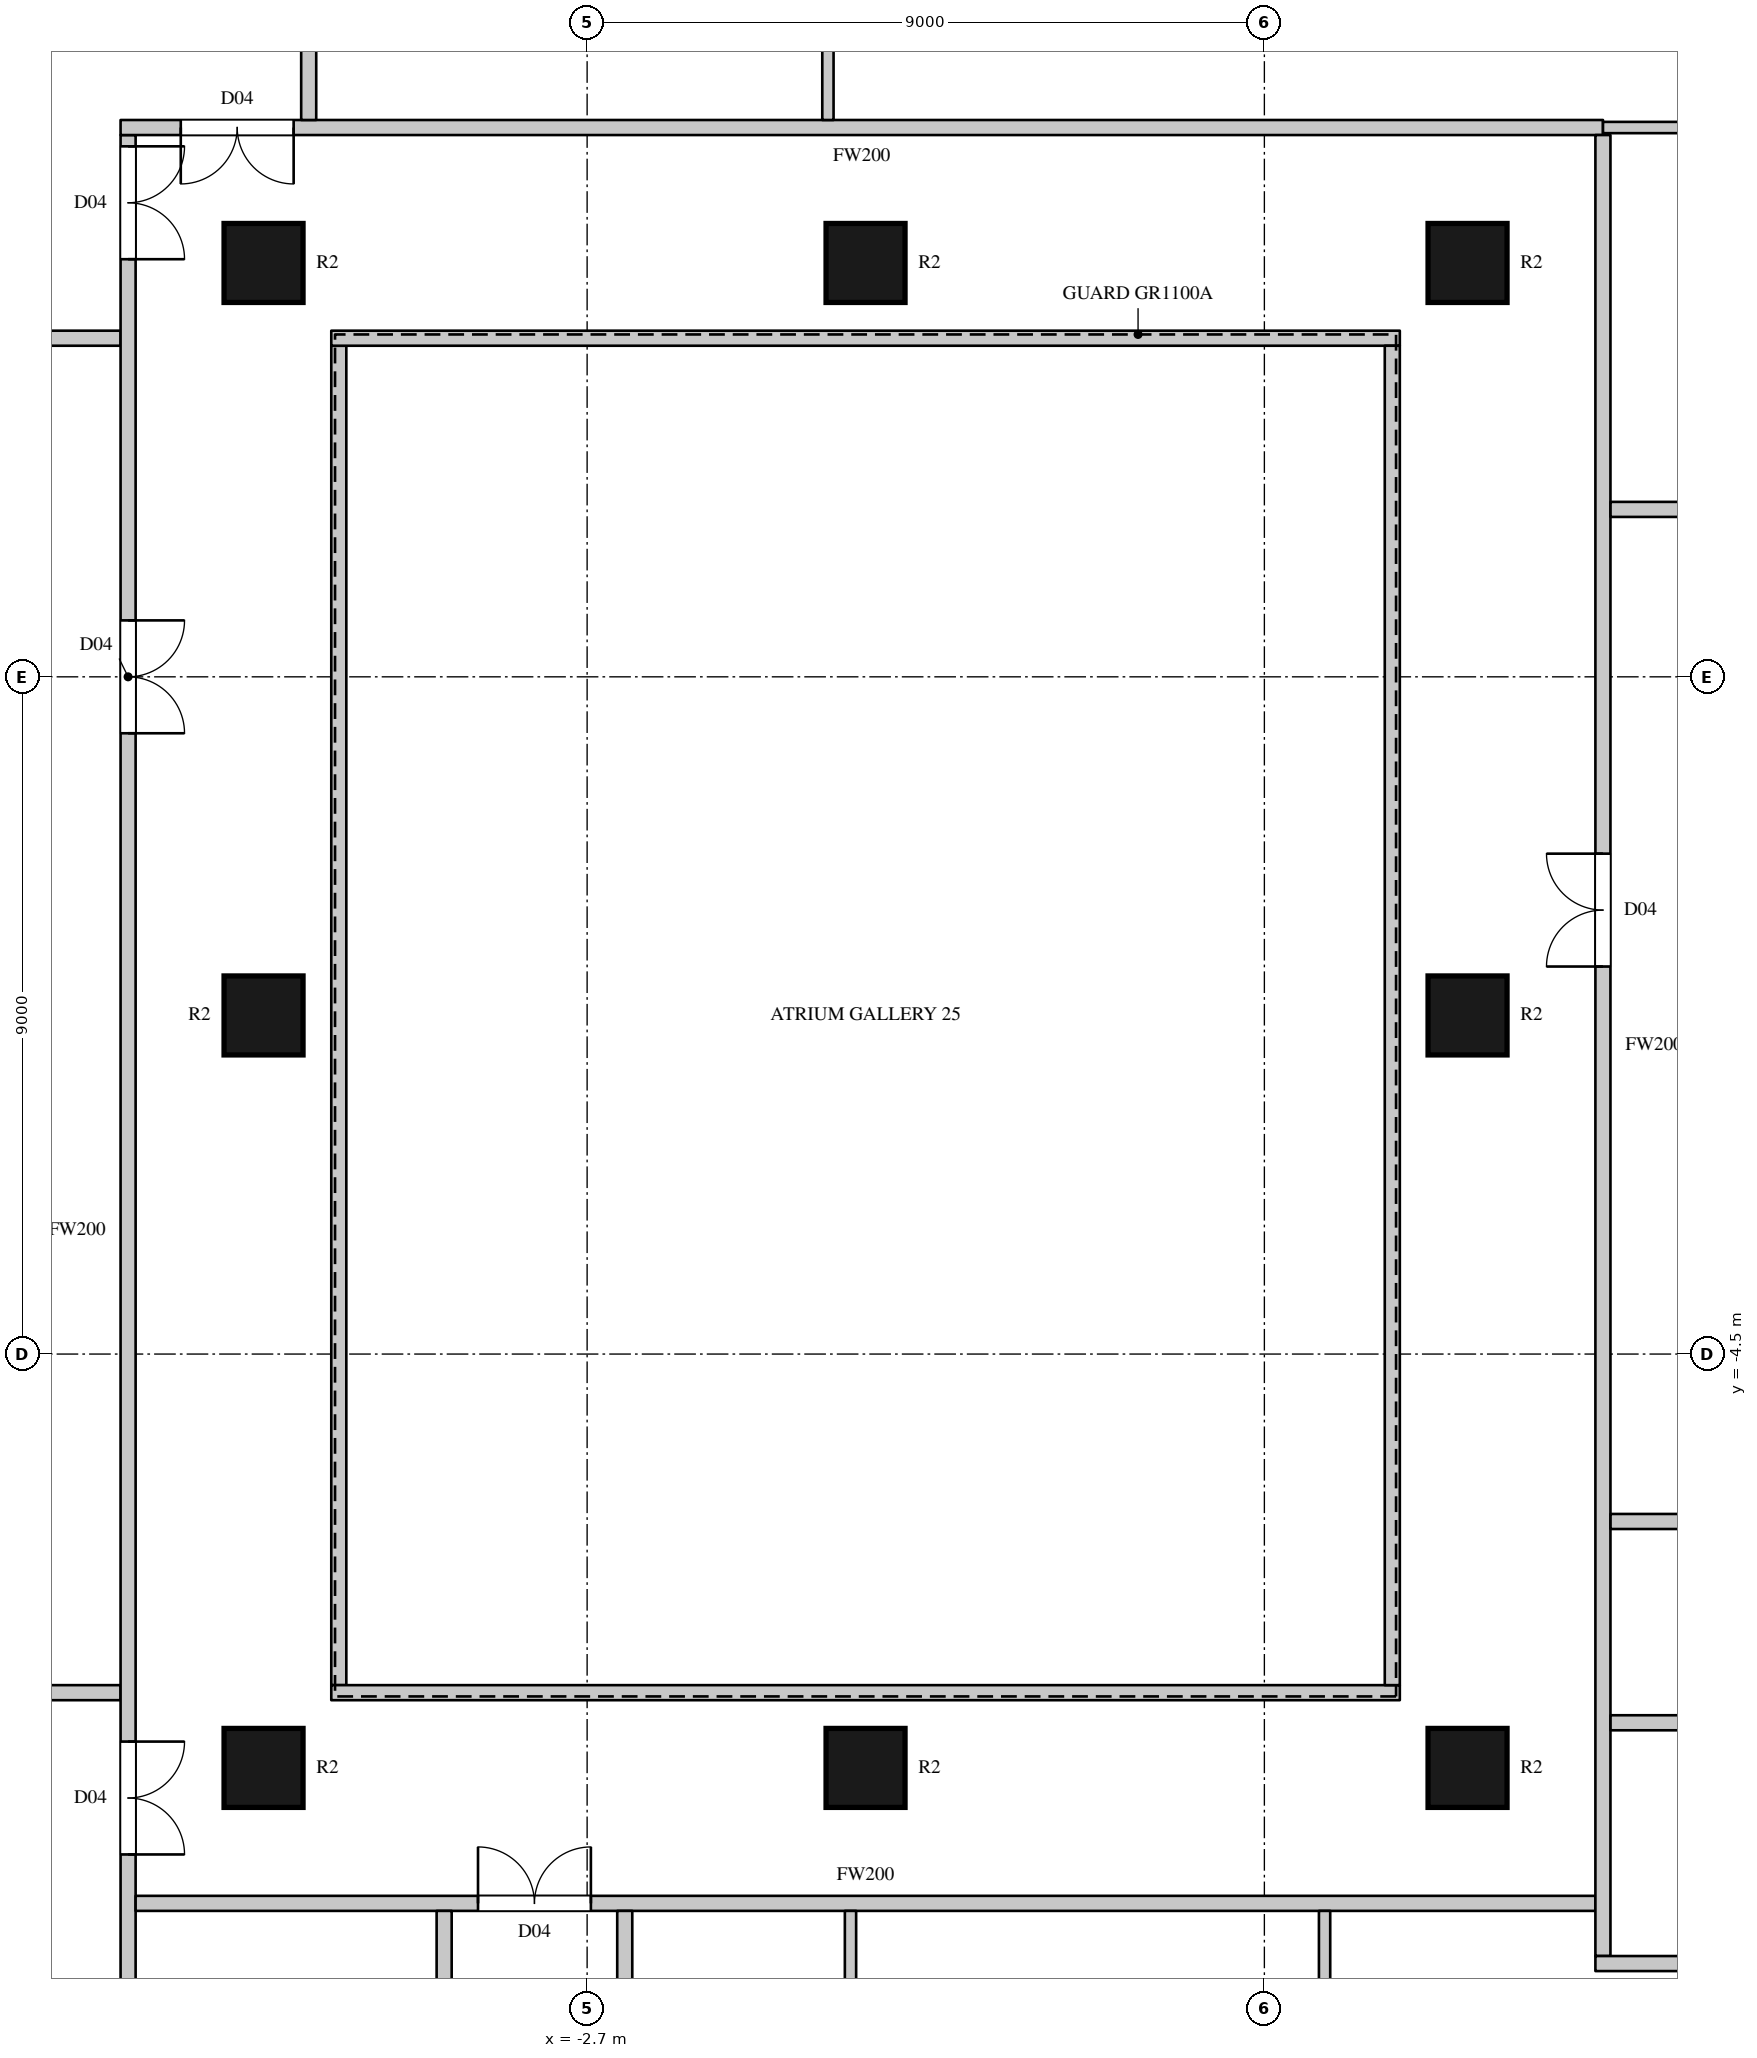
"""IFC4 building model, lengths in metres.
Left out: names, types, materials, properties, quantities, classifications, styles, units other than length and angle.
Written with IfcOpenShell. Run it as: python <this file> out.ifc"""

import sys

from ifc_helpers import new_model, si_unit, direction, frame, frame_2d, origin, origin_2d, place, context, subcontext, project, spatial, rectangle, circle, extrude, element, fill, save


model = new_model("IFC4")
c1 = context("Model", 3, precision=1e-05, world=origin(), true_north=direction((0.0, 1.0)))
c2 = subcontext(c1, "Body", "Model", "MODEL_VIEW")
j1 = project(units=[si_unit("LENGTHUNIT", "METRE"), si_unit("PLANEANGLEUNIT", "RADIAN")], contexts=[c1])
p1 = place(None, origin())
s1 = spatial("IfcSite", under=j1, at=p1, CompositionType="ELEMENT")
p2 = place(p1, origin())
s2 = spatial("IfcBuilding", under=s1, at=p2, CompositionType="ELEMENT")
p3 = place(p2, frame((0.0, 0.0, 120.3)))
s3 = spatial("IfcBuildingStorey", under=s2, at=p3, CompositionType="ELEMENT", Elevation=120.3)
for number, where, z_axis, x_axis in (
    (1, (-7.0, -10.0, 0.0), (0.0, 0.0, 1.0), (1.0, 0.0, 0.0)),
    (2, (-7.0, 0.0, 0.0), (0.0, 0.0, 1.0), (1.0, 0.0, 0.0)),
    (3, (-7.0, 10.0, 0.0), (0.0, 0.0, 1.0), (1.0, 0.0, 0.0)),
    (4, (1.0, -10.0, 0.0), (0.0, 0.0, 1.0), (1.0, 0.0, 0.0)),
    (5, (1.0, 10.0, 0.0), (0.0, 0.0, 1.0), (1.0, 0.0, 0.0)),
    (6, (9.0, -10.0, 0.0), (0.0, 0.0, 1.0), (1.0, 0.0, 0.0)),
    (7, (9.0, 0.0, 0.0), (0.0, 0.0, 1.0), (1.0, 0.0, 0.0)),
    (8, (9.0, 10.0, 0.0), (0.0, 0.0, 1.0), (1.0, 0.0, 0.0)),
):
    element("IfcColumn", number, at=place(p3, frame(where, z_axis=z_axis, x_axis=x_axis)), inside=s3, PredefinedType="COLUMN", context=c2, shape_type="SweptSolid", body=[
        extrude(circle(Radius=0.525, at=origin_2d()), origin(), (0.0, 0.0, 1.0), 3.6),
    ])
p4 = place(p3, frame((-13.97, -9.0, 0.0), z_axis=(0.0, 0.0, 1.0), x_axis=(1.0, 0.0, 0.0)))
e9 = element("IfcWall", 9, at=p4, inside=s3, PredefinedType="PARTITIONING", context=c2, shape_type="SweptSolid", body=[
    extrude(rectangle(XDim=5.07, YDim=0.2, at=frame_2d((2.535, 0.0))), origin(), (0.0, 0.0, 1.0), 3.3),
])
p5 = place(p4, frame((0.4, 0.0, 0.0)))
e10 = element("IfcOpeningElement", 10, at=p5, cuts=e9, PredefinedType="OPENING", context=c2, shape_type="SweptSolid", body=[
    extrude(rectangle(XDim=1.5, YDim=2.2, at=frame_2d((0.75, 1.1))), frame((0.0, 0.11, 0.0), z_axis=(0.0, -1.0, 0.0), x_axis=(1.0, 0.0, 0.0)), (0.0, 0.0, 1.0), 0.22),
])
p6 = place(p4, frame((2.05, 0.0, 0.0)))
e11 = element("IfcOpeningElement", 11, at=p6, cuts=e9, PredefinedType="OPENING", context=c2, shape_type="SweptSolid", body=[
    extrude(rectangle(XDim=1.5, YDim=2.2, at=frame_2d((0.75, 1.1))), frame((0.0, 0.11, 0.0), z_axis=(0.0, -1.0, 0.0), x_axis=(1.0, 0.0, 0.0)), (0.0, 0.0, 1.0), 0.22),
])
p7 = place(p3, frame((-13.97, 9.0, 0.0), z_axis=(0.0, 0.0, 1.0), x_axis=(1.0, 0.0, 0.0)))
e12 = element("IfcWall", 12, at=p7, inside=s3, PredefinedType="PARTITIONING", context=c2, shape_type="SweptSolid", body=[
    extrude(rectangle(XDim=5.07, YDim=0.2, at=frame_2d((2.535, 0.0))), origin(), (0.0, 0.0, 1.0), 3.3),
])
p8 = place(p3, frame((-8.8, -17.4, 0.0), z_axis=(0.0, 0.0, 1.0), x_axis=(0.0, 1.0, 0.0)))
e13 = element("IfcWall", 13, at=p8, inside=s3, PredefinedType="PARTITIONING", context=c2, shape_type="SweptSolid", body=[
    extrude(rectangle(XDim=29.1, YDim=0.2, at=frame_2d((14.55, 0.0))), origin(), (0.0, 0.0, 1.0), 3.3),
])
p9 = place(p8, frame((21.15, 0.0, 0.0)))
e14 = element("IfcOpeningElement", 14, at=p9, cuts=e13, PredefinedType="OPENING", context=c2, shape_type="SweptSolid", body=[
    extrude(rectangle(XDim=1.5, YDim=2.2, at=frame_2d((0.75, 1.1))), frame((0.0, 0.11, 0.0), z_axis=(0.0, -1.0, 0.0), x_axis=(1.0, 0.0, 0.0)), (0.0, 0.0, 1.0), 0.22),
])
p10 = place(p8, frame((6.25, 0.0, 0.0)))
e15 = element("IfcOpeningElement", 15, at=p10, cuts=e13, PredefinedType="OPENING", context=c2, shape_type="SweptSolid", body=[
    extrude(rectangle(XDim=1.5, YDim=2.2, at=frame_2d((0.75, 1.1))), frame((0.0, 0.11, 0.0), z_axis=(0.0, -1.0, 0.0), x_axis=(1.0, 0.0, 0.0)), (0.0, 0.0, 1.0), 0.22),
])
p11 = place(p8, frame((27.45, 0.0, 0.0)))
e16 = element("IfcOpeningElement", 16, at=p11, cuts=e13, PredefinedType="OPENING", context=c2, shape_type="SweptSolid", body=[
    extrude(rectangle(XDim=1.5, YDim=2.2, at=frame_2d((0.75, 1.1))), frame((0.0, 0.11, 0.0), z_axis=(0.0, -1.0, 0.0), x_axis=(1.0, 0.0, 0.0)), (0.0, 0.0, 1.0), 0.22),
])
p12 = place(p8, frame((0.15, 0.0, 0.0)))
e17 = element("IfcOpeningElement", 17, at=p12, cuts=e13, PredefinedType="OPENING", context=c2, shape_type="SweptSolid", body=[
    extrude(rectangle(XDim=0.9, YDim=2.2, at=frame_2d((0.45, 1.1))), frame((0.0, 0.11, 0.0), z_axis=(0.0, -1.0, 0.0), x_axis=(1.0, 0.0, 0.0)), (0.0, 0.0, 1.0), 0.22),
])
p13 = place(p3, frame((-8.7, -11.8, 0.0), z_axis=(0.0, 0.0, 1.0), x_axis=(1.0, 0.0, 0.0)))
e18 = element("IfcWall", 18, at=p13, inside=s3, PredefinedType="PARTITIONING", context=c2, shape_type="SweptSolid", body=[
    extrude(rectangle(XDim=19.4, YDim=0.2, at=frame_2d((9.7, 0.0))), origin(), (0.0, 0.0, 1.0), 3.3),
])
p14 = place(p13, frame((4.55, 0.0, 0.0)))
e19 = element("IfcOpeningElement", 19, at=p14, cuts=e18, PredefinedType="OPENING", context=c2, shape_type="SweptSolid", body=[
    extrude(rectangle(XDim=1.5, YDim=2.2, at=frame_2d((0.75, 1.1))), frame((0.0, 0.11, 0.0), z_axis=(0.0, -1.0, 0.0), x_axis=(1.0, 0.0, 0.0)), (0.0, 0.0, 1.0), 0.22),
])
p15 = place(p3, frame((-8.9, 11.8, 0.0), z_axis=(0.0, 0.0, 1.0), x_axis=(1.0, 0.0, 0.0)))
e20 = element("IfcWall", 20, at=p15, inside=s3, PredefinedType="PARTITIONING", context=c2, shape_type="SweptSolid", body=[
    extrude(rectangle(XDim=19.7, YDim=0.2, at=frame_2d((9.85, 0.0))), origin(), (0.0, 0.0, 1.0), 3.3),
])
p16 = place(p15, frame((0.8, 0.0, 0.0)))
e21 = element("IfcOpeningElement", 21, at=p16, cuts=e20, PredefinedType="OPENING", context=c2, shape_type="SweptSolid", body=[
    extrude(rectangle(XDim=1.5, YDim=2.2, at=frame_2d((0.75, 1.1))), frame((0.0, 0.11, 0.0), z_axis=(0.0, -1.0, 0.0), x_axis=(1.0, 0.0, 0.0)), (0.0, 0.0, 1.0), 0.22),
])
p17 = place(p3, frame((-6.4, 11.9, 0.0), z_axis=(0.0, 0.0, 1.0), x_axis=(0.0, 1.0, 0.0)))
e22 = element("IfcWall", 22, at=p17, inside=s3, PredefinedType="PARTITIONING", context=c2, shape_type="SweptSolid", body=[
    extrude(rectangle(XDim=5.5, YDim=0.2, at=frame_2d((2.75, 0.0))), origin(), (0.0, 0.0, 1.0), 3.3),
])
p18 = place(p17, frame((3.75, 0.0, 0.0)))
e23 = element("IfcOpeningElement", 23, at=p18, cuts=e22, PredefinedType="OPENING", context=c2, shape_type="SweptSolid", body=[
    extrude(rectangle(XDim=1.6, YDim=2.4, at=frame_2d((0.8, 1.2))), frame((0.0, 0.11, 0.0), z_axis=(0.0, -1.0, 0.0), x_axis=(1.0, 0.0, 0.0)), (0.0, 0.0, 1.0), 0.22),
])
p19 = place(p3, frame((-6.0, -8.9, 0.0), z_axis=(0.0, 0.0, 1.0), x_axis=(0.0, 1.0, 0.0)))
e24 = element("IfcWall", 24, at=p19, inside=s3, PredefinedType="PARTITIONING", context=c2, shape_type="SweptSolid", body=[
    extrude(rectangle(XDim=17.8, YDim=0.2, at=frame_2d((8.9, 0.0))), origin(), (0.0, 0.0, 1.0), 3.3),
])
for number, where, z_axis, x_axis in (
    (25, (-6.1, -9.0, 0.0), (0.0, 0.0, 1.0), (1.0, 0.0, 0.0)),
    (26, (-6.1, 9.0, 0.0), (0.0, 0.0, 1.0), (1.0, 0.0, 0.0)),
):
    element("IfcWall", number, at=place(p3, frame(where, z_axis=z_axis, x_axis=x_axis)), inside=s3, PredefinedType="PARTITIONING", context=c2, shape_type="SweptSolid", body=[
        extrude(rectangle(XDim=14.2, YDim=0.2, at=frame_2d((7.1, 0.0))), origin(), (0.0, 0.0, 1.0), 3.3),
    ])
p20 = place(p3, frame((-4.6, -17.4, 0.0), z_axis=(0.0, 0.0, 1.0), x_axis=(0.0, 1.0, 0.0)))
e27 = element("IfcWall", 27, at=p20, inside=s3, PredefinedType="PARTITIONING", context=c2, shape_type="SweptSolid", body=[
    extrude(rectangle(XDim=5.5, YDim=0.2, at=frame_2d((2.75, 0.0))), origin(), (0.0, 0.0, 1.0), 3.3),
])
p21 = place(p3, frame((-2.2, -17.178, 0.0), z_axis=(0.0, 0.0, 1.0), x_axis=(0.0, 1.0, 0.0)))
e28 = element("IfcWall", 28, at=p21, inside=s3, PredefinedType="PARTITIONING", context=c2, shape_type="SweptSolid", body=[
    extrude(rectangle(XDim=5.279, YDim=0.2, at=frame_2d((2.639, 0.0))), origin(), (0.0, 0.0, 1.0), 3.3),
])
p22 = place(p21, frame((0.35, 0.0, 0.0)))
e29 = element("IfcOpeningElement", 29, at=p22, cuts=e28, PredefinedType="OPENING", context=c2, shape_type="SweptSolid", body=[
    extrude(rectangle(XDim=0.9, YDim=2.2, at=frame_2d((0.45, 1.1))), frame((0.0, 0.11, 0.0), z_axis=(0.0, -1.0, 0.0), x_axis=(1.0, 0.0, 0.0)), (0.0, 0.0, 1.0), 0.22),
])
p23 = place(p3, frame((8.0, -8.9, 0.0), z_axis=(0.0, 0.0, 1.0), x_axis=(0.0, 1.0, 0.0)))
e30 = element("IfcWall", 30, at=p23, inside=s3, PredefinedType="PARTITIONING", context=c2, shape_type="SweptSolid", body=[
    extrude(rectangle(XDim=17.8, YDim=0.2, at=frame_2d((8.9, 0.0))), origin(), (0.0, 0.0, 1.0), 3.3),
])
p24 = place(p3, frame((10.799, -12.5, 0.0), z_axis=(0.0, 0.0, 1.0), x_axis=(0.0, 1.0, 0.0)))
e31 = element("IfcWall", 31, at=p24, inside=s3, PredefinedType="PARTITIONING", context=c2, shape_type="SweptSolid", body=[
    extrude(rectangle(XDim=24.2, YDim=0.2, at=frame_2d((12.1, 0.0))), origin(), (0.0, 0.0, 1.0), 3.3),
])
p25 = place(p24, frame((13.15, 0.0, 0.0)))
e32 = element("IfcOpeningElement", 32, at=p25, cuts=e31, PredefinedType="OPENING", context=c2, shape_type="SweptSolid", body=[
    extrude(rectangle(XDim=1.5, YDim=2.2, at=frame_2d((0.75, 1.1))), frame((0.0, 0.11, 0.0), z_axis=(0.0, -1.0, 0.0), x_axis=(1.0, 0.0, 0.0)), (0.0, 0.0, 1.0), 0.22),
])
p26 = place(p3, frame((10.699, -12.6, 0.0), z_axis=(0.0, 0.0, 1.0), x_axis=(1.0, 0.0, 0.0)))
e33 = element("IfcWall", 33, at=p26, inside=s3, PredefinedType="PARTITIONING", context=c2, shape_type="SweptSolid", body=[
    extrude(rectangle(XDim=5.501, YDim=0.2, at=frame_2d((2.75, 0.0))), origin(), (0.0, 0.0, 1.0), 3.3),
])
p27 = place(p3, frame((10.9, -9.4, 0.0), z_axis=(0.0, 0.0, 1.0), x_axis=(1.0, 0.0, 0.0)))
e34 = element("IfcWall", 34, at=p27, inside=s3, PredefinedType="PARTITIONING", context=c2, shape_type="SweptSolid", body=[
    extrude(rectangle(XDim=5.3, YDim=0.2, at=frame_2d((2.65, 0.0))), origin(), (0.0, 0.0, 1.0), 3.3),
])
p28 = place(p27, frame((4.05, 0.0, 0.0)))
e35 = element("IfcOpeningElement", 35, at=p28, cuts=e34, PredefinedType="OPENING", context=c2, shape_type="SweptSolid", body=[
    extrude(rectangle(XDim=0.95, YDim=2.2, at=frame_2d((0.475, 1.1))), frame((0.0, 0.11, 0.0), z_axis=(0.0, -1.0, 0.0), x_axis=(1.0, 0.0, 0.0)), (0.0, 0.0, 1.0), 0.22),
])
p29 = place(p3, frame((10.9, -6.725, 0.0), z_axis=(0.0, 0.0, 1.0), x_axis=(1.0, 0.0, 0.0)))
e36 = element("IfcWall", 36, at=p29, inside=s3, PredefinedType="PARTITIONING", context=c2, shape_type="SweptSolid", body=[
    extrude(rectangle(XDim=5.3, YDim=0.2, at=frame_2d((2.65, 0.0))), origin(), (0.0, 0.0, 1.0), 3.3),
])
p30 = place(p3, frame((10.9, 6.725, 0.0), z_axis=(0.0, 0.0, 1.0), x_axis=(1.0, 0.0, 0.0)))
e37 = element("IfcWall", 37, at=p30, inside=s3, PredefinedType="PARTITIONING", context=c2, shape_type="SweptSolid", body=[
    extrude(rectangle(XDim=5.3, YDim=0.2, at=frame_2d((2.65, 0.0))), origin(), (0.0, 0.0, 1.0), 3.3),
])
p31 = place(p30, frame((4.1, 0.0, 0.0)))
e38 = element("IfcOpeningElement", 38, at=p31, cuts=e37, PredefinedType="OPENING", context=c2, shape_type="SweptSolid", body=[
    extrude(rectangle(XDim=0.9, YDim=2.2, at=frame_2d((0.45, 1.1))), frame((0.0, 0.11, 0.0), z_axis=(0.0, -1.0, 0.0), x_axis=(1.0, 0.0, 0.0)), (0.0, 0.0, 1.0), 0.22),
])
for number, where, z_axis, x_axis in (
    (39, (0.5, 11.9, 0.0), (0.0, 0.0, 1.0), (0.0, 1.0, 0.0)),
    (40, (0.8, -17.4, 0.0), (0.0, 0.0, 1.0), (0.0, 1.0, 0.0)),
    (41, (7.1, -17.4, 0.0), (0.0, 0.0, 1.0), (0.0, 1.0, 0.0)),
):
    element("IfcWall", number, at=place(p3, frame(where, z_axis=z_axis, x_axis=x_axis)), inside=s3, PredefinedType="PARTITIONING", context=c2, shape_type="SweptSolid", body=[
        extrude(rectangle(XDim=5.5, YDim=0.15, at=frame_2d((2.75, 0.0))), origin(), (0.0, 0.0, 1.0), 3.3),
    ])
p32 = place(p3, frame((10.8, 11.8, 0.0), z_axis=(0.0, 0.0, 1.0), x_axis=(1.0, 0.0, 0.0)))
e42 = element("IfcWall", 42, at=p32, inside=s3, PredefinedType="PARTITIONING", context=c2, shape_type="SweptSolid", body=[
    extrude(rectangle(XDim=5.2, YDim=0.15, at=frame_2d((2.6, 0.0))), origin(), (0.0, 0.0, 1.0), 3.3),
])
p33 = place(p9, origin())
e43 = element("IfcDoor", 43, at=p33, inside=s3, OperationType="DOUBLE_DOOR_SINGLE_SWING", PredefinedType="DOOR", context=c2, shape_type="SweptSolid", body=[
    extrude(rectangle(XDim=1.5, YDim=2.2, at=frame_2d((0.75, 1.1))), frame((0.0, 0.025, 0.0), z_axis=(0.0, -1.0, 0.0), x_axis=(1.0, 0.0, 0.0)), (0.0, 0.0, 1.0), 0.05),
])
fill(e14, e43)
p34 = place(p10, origin())
e44 = element("IfcDoor", 44, at=p34, inside=s3, OperationType="DOUBLE_DOOR_SINGLE_SWING", PredefinedType="DOOR", context=c2, shape_type="SweptSolid", body=[
    extrude(rectangle(XDim=1.5, YDim=2.2, at=frame_2d((0.75, 1.1))), frame((0.0, 0.025, 0.0), z_axis=(0.0, -1.0, 0.0), x_axis=(1.0, 0.0, 0.0)), (0.0, 0.0, 1.0), 0.05),
])
fill(e15, e44)
p35 = place(p11, origin())
e45 = element("IfcDoor", 45, at=p35, inside=s3, OperationType="DOUBLE_DOOR_SINGLE_SWING", PredefinedType="DOOR", context=c2, shape_type="SweptSolid", body=[
    extrude(rectangle(XDim=1.5, YDim=2.2, at=frame_2d((0.75, 1.1))), frame((0.0, 0.025, 0.0), z_axis=(0.0, -1.0, 0.0), x_axis=(1.0, 0.0, 0.0)), (0.0, 0.0, 1.0), 0.05),
])
fill(e16, e45)
p36 = place(p14, origin())
e46 = element("IfcDoor", 46, at=p36, inside=s3, OperationType="DOUBLE_DOOR_SINGLE_SWING", PredefinedType="DOOR", context=c2, shape_type="SweptSolid", body=[
    extrude(rectangle(XDim=1.5, YDim=2.2, at=frame_2d((0.75, 1.1))), frame((0.0, 0.025, 0.0), z_axis=(0.0, -1.0, 0.0), x_axis=(1.0, 0.0, 0.0)), (0.0, 0.0, 1.0), 0.05),
])
fill(e19, e46)
p37 = place(p16, origin())
e47 = element("IfcDoor", 47, at=p37, inside=s3, OperationType="DOUBLE_DOOR_SINGLE_SWING", PredefinedType="DOOR", context=c2, shape_type="SweptSolid", body=[
    extrude(rectangle(XDim=1.5, YDim=2.2, at=frame_2d((0.75, 1.1))), frame((0.0, 0.025, 0.0), z_axis=(0.0, -1.0, 0.0), x_axis=(1.0, 0.0, 0.0)), (0.0, 0.0, 1.0), 0.05),
])
fill(e21, e47)
p38 = place(p25, origin())
e48 = element("IfcDoor", 48, at=p38, inside=s3, OperationType="DOUBLE_DOOR_SINGLE_SWING", PredefinedType="DOOR", context=c2, shape_type="SweptSolid", body=[
    extrude(rectangle(XDim=1.5, YDim=2.2, at=frame_2d((0.75, 1.1))), frame((0.0, 0.025, 0.0), z_axis=(0.0, -1.0, 0.0), x_axis=(1.0, 0.0, 0.0)), (0.0, 0.0, 1.0), 0.05),
])
fill(e32, e48)
save(model, sys.argv[1])
